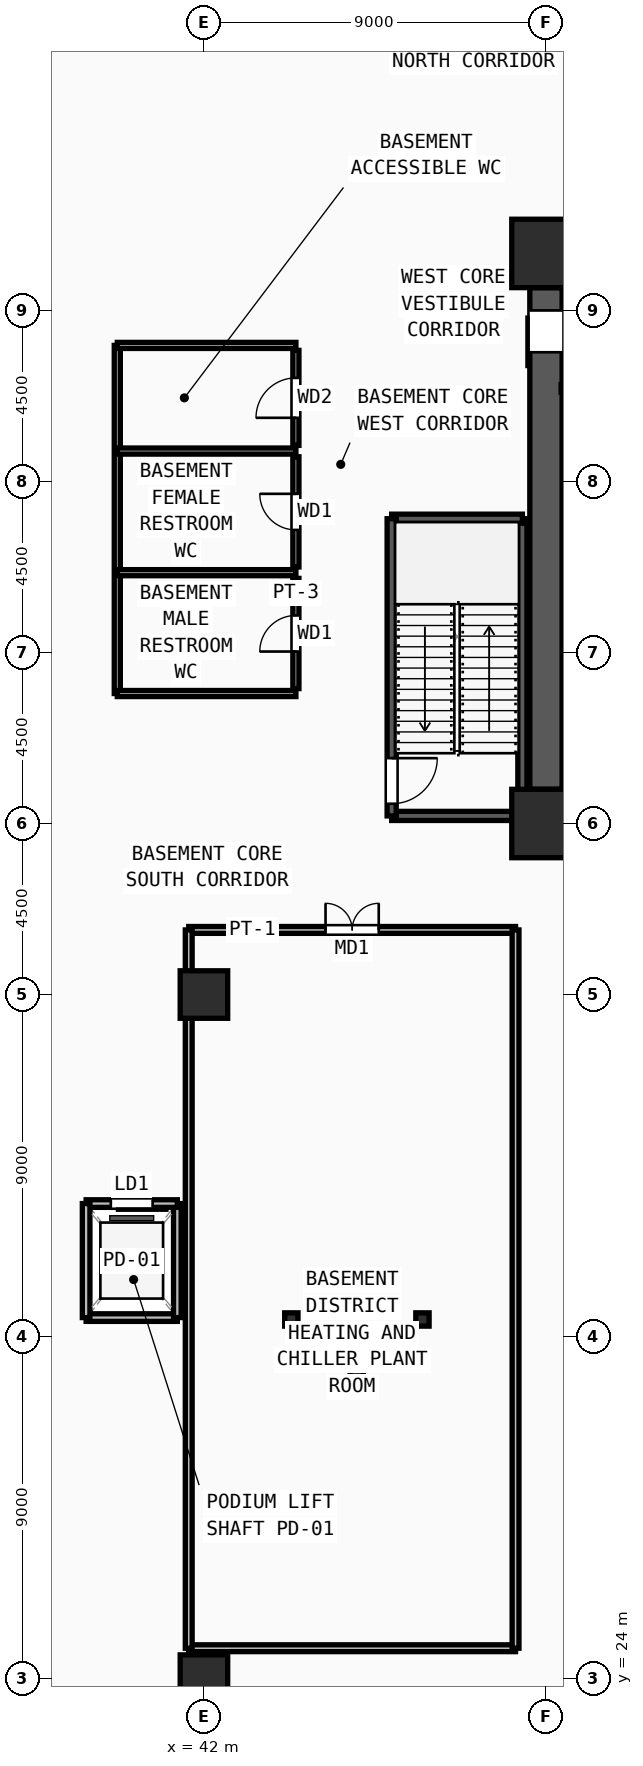
"""IFC4 building model, lengths in metres.
Left out: names, types, materials, properties, quantities, classifications, styles, units other than length and angle.
Written with IfcOpenShell. Run it as: python <this file> out.ifc"""

import sys

from ifc_helpers import new_model, si_unit, direction, frame, frame_2d, origin, origin_2d, place, context, subcontext, project, spatial, rectangle, i_section, extrude, source, transform, mapped, element, fill, save


model = new_model("IFC4")
c1 = context("Model", 3, precision=1e-05, world=origin(), true_north=direction((0.0, 1.0)))
c2 = subcontext(c1, "Body", "Model", "MODEL_VIEW")
j1 = project(units=[si_unit("LENGTHUNIT", "METRE"), si_unit("PLANEANGLEUNIT", "RADIAN")], contexts=[c1])
p1 = place(None, origin())
s1 = spatial("IfcSite", under=j1, at=p1, CompositionType="ELEMENT")
p2 = place(p1, origin())
s2 = spatial("IfcBuilding", under=s1, at=p2, CompositionType="ELEMENT")
p3 = place(p2, frame((0.0, 0.0, -4.8)))
s3 = spatial("IfcBuildingStorey", under=s2, at=p3, CompositionType="ELEMENT", Elevation=-4.8)
m1 = source(origin(), c2, "Body", "SweptSolid", [
    extrude(rectangle(XDim=1.8, YDim=1.8, at=origin_2d()), origin(), (0.0, 0.0, 1.0), 4.8),
])
for number, where, z_axis, x_axis in (
    (1, (51.0, 46.5, 0.0), (0.0, 0.0, 1.0), (1.0, 0.0, 0.0)),
    (2, (51.0, 61.5, 0.0), (0.0, 0.0, 1.0), (1.0, 0.0, 0.0)),
):
    element("IfcColumn", number, at=place(p3, frame(where, z_axis=z_axis, x_axis=x_axis)), inside=s3, PredefinedType="COLUMN", context=c2, shape_type="MappedRepresentation", body=[
        mapped(m1, transform((0.0, 0.0, 0.0), x_axis=(1.0, 0.0, 0.0), y_axis=(0.0, 1.0, 0.0), z_axis=(0.0, 0.0, 1.0), scale=1.0)),
    ])
m2 = source(origin(), c2, "Body", "SweptSolid", [
    extrude(rectangle(XDim=1.25, YDim=1.25, at=origin_2d()), origin(), (0.0, 0.0, 1.0), 4.8),
])
for number, where, z_axis, x_axis in (
    (3, (42.0, 24.0, 0.0), (0.0, 0.0, 1.0), (1.0, 0.0, 0.0)),
    (4, (42.0, 42.0, 0.0), (0.0, 0.0, 1.0), (1.0, 0.0, 0.0)),
):
    element("IfcColumn", number, at=place(p3, frame(where, z_axis=z_axis, x_axis=x_axis)), inside=s3, PredefinedType="COLUMN", context=c2, shape_type="MappedRepresentation", body=[
        mapped(m2, transform((0.0, 0.0, 0.0), x_axis=(1.0, 0.0, 0.0), y_axis=(0.0, 1.0, 0.0), z_axis=(0.0, 0.0, 1.0), scale=1.0)),
    ])
m3 = source(origin(), c2, "Body", "SweptSolid", [
    extrude(i_section(OverallWidth=0.35, OverallDepth=0.35, WebThickness=0.012, FlangeThickness=0.019, at=origin_2d()), origin(), (0.0, 0.0, 1.0), 4.8),
])
for number, where, z_axis, x_axis in (
    (5, (44.3, 33.45, 0.0), (0.0, 0.0, 1.0), (1.0, 0.0, 0.0)),
    (6, (47.75, 33.45, 0.0), (0.0, 0.0, 1.0), (1.0, 0.0, 0.0)),
    (7, (46.02, 32.05, 0.0), (0.0, 0.0, 1.0), (1.0, 0.0, 0.0)),
):
    element("IfcColumn", number, at=place(p3, frame(where, z_axis=z_axis, x_axis=x_axis)), inside=s3, PredefinedType="COLUMN", context=c2, shape_type="MappedRepresentation", body=[
        mapped(m3, transform((0.0, 0.0, 0.0), x_axis=(1.0, 0.0, 0.0), y_axis=(0.0, 1.0, 0.0), z_axis=(0.0, 0.0, 1.0), scale=1.0)),
    ])
p4 = place(p3, frame((51.0, 47.4, 0.0), z_axis=(0.0, 0.0, 1.0), x_axis=(0.0, 1.0, 0.0)))
e8 = element("IfcWall", 8, at=p4, inside=s3, PredefinedType="SHEAR", context=c2, shape_type="SweptSolid", body=[
    extrude(rectangle(XDim=13.2, YDim=0.85, at=frame_2d((6.6, 0.0))), origin(), (0.0, 0.0, 1.0), 4.55),
])
m4 = source(origin(), c2, "Body", "SweptSolid", [
    extrude(rectangle(XDim=1.1, YDim=2.2, at=frame_2d((0.55, 1.1))), frame((0.0, 0.435, 0.0), z_axis=(0.0, -1.0, 0.0), x_axis=(1.0, 0.0, 0.0)), (0.0, 0.0, 1.0), 0.87),
])
p5 = place(p4, frame((11.5, 0.0, 0.0)))
e9 = element("IfcOpeningElement", 9, at=p5, cuts=e8, PredefinedType="OPENING", context=c2, shape_type="MappedRepresentation", body=[
    mapped(m4, transform((0.0, 0.0, 0.0), x_axis=(1.0, 0.0, 0.0), y_axis=(0.0, 1.0, 0.0), z_axis=(0.0, 0.0, 1.0), scale=1.0)),
])
p6 = place(p3, frame((46.94, 46.7, 0.0), z_axis=(0.0, 0.0, 1.0), x_axis=(1.0, 0.0, 0.0)))
e10 = element("IfcWall", 10, at=p6, inside=s3, PredefinedType="SOLIDWALL", context=c2, shape_type="SweptSolid", body=[
    extrude(rectangle(XDim=3.44, YDim=0.24, at=frame_2d((1.72, 0.0))), origin(), (0.0, 0.0, 1.0), 4.55),
])
p7 = place(p3, frame((50.38, 46.7, 0.0), z_axis=(0.0, 0.0, 1.0), x_axis=(0.0, 1.0, 0.0)))
e11 = element("IfcWall", 11, at=p7, inside=s3, PredefinedType="SOLIDWALL", context=c2, shape_type="SweptSolid", body=[
    extrude(rectangle(XDim=7.82, YDim=0.24, at=frame_2d((3.91, 0.0))), origin(), (0.0, 0.0, 1.0), 4.55),
])
p8 = place(p3, frame((50.38, 54.52, 0.0), z_axis=(0.0, 0.0, 1.0), x_axis=(-1.0, 0.0, 0.0)))
e12 = element("IfcWall", 12, at=p8, inside=s3, PredefinedType="SOLIDWALL", context=c2, shape_type="SweptSolid", body=[
    extrude(rectangle(XDim=3.44, YDim=0.24, at=frame_2d((1.72, 0.0))), origin(), (0.0, 0.0, 1.0), 4.55),
])
p9 = place(p3, frame((46.94, 54.52, 0.0), z_axis=(0.0, 0.0, 1.0), x_axis=(0.0, -1.0, 0.0)))
e13 = element("IfcWall", 13, at=p9, inside=s3, PredefinedType="SOLIDWALL", context=c2, shape_type="SweptSolid", body=[
    extrude(rectangle(XDim=7.82, YDim=0.24, at=frame_2d((3.91, 0.0))), origin(), (0.0, 0.0, 1.0), 4.55),
])
m5 = source(origin(), c2, "Body", "SweptSolid", [
    extrude(rectangle(XDim=1.2, YDim=2.2, at=frame_2d((0.6, 1.1))), frame((0.0, 0.13, 0.0), z_axis=(0.0, -1.0, 0.0), x_axis=(1.0, 0.0, 0.0)), (0.0, 0.0, 1.0), 0.26),
])
p10 = place(p9, frame((6.3, 0.0, 0.0)))
e14 = element("IfcOpeningElement", 14, at=p10, cuts=e13, PredefinedType="OPENING", context=c2, shape_type="MappedRepresentation", body=[
    mapped(m5, transform((0.0, 0.0, 0.0), x_axis=(1.0, 0.0, 0.0), y_axis=(0.0, 1.0, 0.0), z_axis=(0.0, 0.0, 1.0), scale=1.0)),
])
for number, where, z_axis, x_axis in (
    (15, (51.4, 57.95, 0.0), (0.0, 0.0, 1.0), (1.0, 0.0, 0.0)),
    (16, (53.8, 60.88, 0.0), (0.0, 0.0, 1.0), (-1.0, 0.0, 0.0)),
    (17, (38.9, 33.5, 0.0), (0.0, 0.0, 1.0), (1.0, 0.0, 0.0)),
):
    element("IfcWall", number, at=place(p3, frame(where, z_axis=z_axis, x_axis=x_axis)), inside=s3, PredefinedType="SOLIDWALL", context=c2, shape_type="SweptSolid", body=[
        extrude(rectangle(XDim=2.4, YDim=0.2, at=frame_2d((1.2, 0.0))), origin(), (0.0, 0.0, 1.0), 4.55),
    ])
p11 = place(p3, frame((41.3, 33.5, 0.0), z_axis=(0.0, 0.0, 1.0), x_axis=(0.0, 1.0, 0.0)))
e18 = element("IfcWall", 18, at=p11, inside=s3, PredefinedType="SOLIDWALL", context=c2, shape_type="SweptSolid", body=[
    extrude(rectangle(XDim=3.0, YDim=0.2, at=frame_2d((1.5, 0.0))), origin(), (0.0, 0.0, 1.0), 4.55),
])
p12 = place(p3, frame((41.3, 36.5, 0.0), z_axis=(0.0, 0.0, 1.0), x_axis=(-1.0, 0.0, 0.0)))
e19 = element("IfcWall", 19, at=p12, inside=s3, PredefinedType="SOLIDWALL", context=c2, shape_type="SweptSolid", body=[
    extrude(rectangle(XDim=2.4, YDim=0.2, at=frame_2d((1.2, 0.0))), origin(), (0.0, 0.0, 1.0), 4.55),
])
m6 = source(origin(), c2, "Body", "SweptSolid", [
    extrude(rectangle(XDim=1.1, YDim=2.2, at=frame_2d((0.55, 1.1))), frame((0.0, 0.11, 0.0), z_axis=(0.0, -1.0, 0.0), x_axis=(1.0, 0.0, 0.0)), (0.0, 0.0, 1.0), 0.22),
])
p13 = place(p12, frame((0.65, 0.0, 0.0)))
e20 = element("IfcOpeningElement", 20, at=p13, cuts=e19, PredefinedType="OPENING", context=c2, shape_type="MappedRepresentation", body=[
    mapped(m6, transform((0.0, 0.0, 0.0), x_axis=(1.0, 0.0, 0.0), y_axis=(0.0, 1.0, 0.0), z_axis=(0.0, 0.0, 1.0), scale=1.0)),
])
p14 = place(p3, frame((38.9, 36.5, 0.0), z_axis=(0.0, 0.0, 1.0), x_axis=(0.0, -1.0, 0.0)))
e21 = element("IfcWall", 21, at=p14, inside=s3, PredefinedType="SOLIDWALL", context=c2, shape_type="SweptSolid", body=[
    extrude(rectangle(XDim=3.0, YDim=0.2, at=frame_2d((1.5, 0.0))), origin(), (0.0, 0.0, 1.0), 4.55),
])
p15 = place(p3, frame((44.42, 50.05, 0.0), z_axis=(0.0, 0.0, 1.0), x_axis=(0.0, 1.0, 0.0)))
e22 = element("IfcWall", 22, at=p15, inside=s3, PredefinedType="PARTITIONING", context=c2, shape_type="SweptSolid", body=[
    extrude(rectangle(XDim=2.9, YDim=0.16, at=frame_2d((1.45, 0.0))), origin(), (0.0, 0.0, 1.0), 4.55),
])
m7 = source(origin(), c2, "Body", "SweptSolid", [
    extrude(rectangle(XDim=0.95, YDim=2.15, at=frame_2d((0.475, 1.075))), frame((0.0, 0.09, 0.0), z_axis=(0.0, -1.0, 0.0), x_axis=(1.0, 0.0, 0.0)), (0.0, 0.0, 1.0), 0.18),
])
p16 = place(p15, frame((0.975, 0.0, 0.0)))
e23 = element("IfcOpeningElement", 23, at=p16, cuts=e22, PredefinedType="OPENING", context=c2, shape_type="MappedRepresentation", body=[
    mapped(m7, transform((0.0, 0.0, 0.0), x_axis=(1.0, 0.0, 0.0), y_axis=(0.0, 1.0, 0.0), z_axis=(0.0, 0.0, 1.0), scale=1.0)),
])
p17 = place(p3, frame((44.42, 53.25, 0.0), z_axis=(0.0, 0.0, 1.0), x_axis=(0.0, 1.0, 0.0)))
e24 = element("IfcWall", 24, at=p17, inside=s3, PredefinedType="PARTITIONING", context=c2, shape_type="SweptSolid", body=[
    extrude(rectangle(XDim=2.9, YDim=0.16, at=frame_2d((1.45, 0.0))), origin(), (0.0, 0.0, 1.0), 4.55),
])
p18 = place(p17, frame((0.975, 0.0, 0.0)))
e25 = element("IfcOpeningElement", 25, at=p18, cuts=e24, PredefinedType="OPENING", context=c2, shape_type="MappedRepresentation", body=[
    mapped(m7, transform((0.0, 0.0, 0.0), x_axis=(1.0, 0.0, 0.0), y_axis=(0.0, 1.0, 0.0), z_axis=(0.0, 0.0, 1.0), scale=1.0)),
])
p19 = place(p3, frame((44.42, 56.45, 0.0), z_axis=(0.0, 0.0, 1.0), x_axis=(0.0, 1.0, 0.0)))
e26 = element("IfcWall", 26, at=p19, inside=s3, PredefinedType="PARTITIONING", context=c2, shape_type="SweptSolid", body=[
    extrude(rectangle(XDim=2.5, YDim=0.16, at=frame_2d((1.25, 0.0))), origin(), (0.0, 0.0, 1.0), 4.55),
])
m8 = source(origin(), c2, "Body", "SweptSolid", [
    extrude(rectangle(XDim=1.05, YDim=2.15, at=frame_2d((0.525, 1.075))), frame((0.0, 0.09, 0.0), z_axis=(0.0, -1.0, 0.0), x_axis=(1.0, 0.0, 0.0)), (0.0, 0.0, 1.0), 0.18),
])
p20 = place(p19, frame((0.725, 0.0, 0.0)))
e27 = element("IfcOpeningElement", 27, at=p20, cuts=e26, PredefinedType="OPENING", context=c2, shape_type="MappedRepresentation", body=[
    mapped(m8, transform((0.0, 0.0, 0.0), x_axis=(1.0, 0.0, 0.0), y_axis=(0.0, 1.0, 0.0), z_axis=(0.0, 0.0, 1.0), scale=1.0)),
])
p21 = place(p3, frame((41.6, 43.7, 0.0), z_axis=(0.0, 0.0, 1.0), x_axis=(1.0, 0.0, 0.0)))
e28 = element("IfcWall", 28, at=p21, inside=s3, PredefinedType="PARTITIONING", context=c2, shape_type="SweptSolid", body=[
    extrude(rectangle(XDim=8.6, YDim=0.18, at=frame_2d((4.3, 0.0))), origin(), (0.0, 0.0, 1.0), 4.55),
])
m9 = source(origin(), c2, "Body", "SweptSolid", [
    extrude(rectangle(XDim=1.4, YDim=2.25, at=frame_2d((0.7, 1.125))), frame((0.0, 0.1, 0.0), z_axis=(0.0, -1.0, 0.0), x_axis=(1.0, 0.0, 0.0)), (0.0, 0.0, 1.0), 0.2),
])
p22 = place(p21, frame((3.6, 0.0, 0.0)))
e29 = element("IfcOpeningElement", 29, at=p22, cuts=e28, PredefinedType="OPENING", context=c2, shape_type="MappedRepresentation", body=[
    mapped(m9, transform((0.0, 0.0, 0.0), x_axis=(1.0, 0.0, 0.0), y_axis=(0.0, 1.0, 0.0), z_axis=(0.0, 0.0, 1.0), scale=1.0)),
])
p23 = place(p3, frame((39.72, 49.92, 0.0), z_axis=(0.0, 0.0, 1.0), x_axis=(0.0, 1.0, 0.0)))
e30 = element("IfcWall", 30, at=p23, inside=s3, PredefinedType="PARTITIONING", context=c2, shape_type="SweptSolid", body=[
    extrude(rectangle(XDim=9.16, YDim=0.16, at=frame_2d((4.58, 0.0))), origin(), (0.0, 0.0, 1.0), 4.55),
])
for number, where, z_axis, x_axis in (
    (31, (39.72, 49.92, 0.0), (0.0, 0.0, 1.0), (1.0, 0.0, 0.0)),
    (32, (39.72, 53.1, 0.0), (0.0, 0.0, 1.0), (1.0, 0.0, 0.0)),
    (33, (39.72, 56.3, 0.0), (0.0, 0.0, 1.0), (1.0, 0.0, 0.0)),
    (34, (39.72, 59.08, 0.0), (0.0, 0.0, 1.0), (1.0, 0.0, 0.0)),
):
    element("IfcWall", number, at=place(p3, frame(where, z_axis=z_axis, x_axis=x_axis)), inside=s3, PredefinedType="PARTITIONING", context=c2, shape_type="SweptSolid", body=[
        extrude(rectangle(XDim=4.7, YDim=0.16, at=frame_2d((2.35, 0.0))), origin(), (0.0, 0.0, 1.0), 4.55),
    ])
p24 = place(p3, frame((41.6, 24.8, 0.0), z_axis=(0.0, 0.0, 1.0), x_axis=(1.0, 0.0, 0.0)))
e35 = element("IfcWall", 35, at=p24, inside=s3, PredefinedType="PARTITIONING", context=c2, shape_type="SweptSolid", body=[
    extrude(rectangle(XDim=8.6, YDim=0.18, at=frame_2d((4.3, 0.0))), origin(), (0.0, 0.0, 1.0), 4.55),
])
for number, where, z_axis, x_axis in (
    (36, (41.6, 24.8, 0.0), (0.0, 0.0, 1.0), (0.0, 1.0, 0.0)),
    (37, (50.2, 24.8, 0.0), (0.0, 0.0, 1.0), (0.0, 1.0, 0.0)),
):
    element("IfcWall", number, at=place(p3, frame(where, z_axis=z_axis, x_axis=x_axis)), inside=s3, PredefinedType="PARTITIONING", context=c2, shape_type="SweptSolid", body=[
        extrude(rectangle(XDim=18.9, YDim=0.18, at=frame_2d((9.45, 0.0))), origin(), (0.0, 0.0, 1.0), 4.55),
    ])
m10 = source(origin(), c2, "Body", "SweptSolid", [
    extrude(rectangle(XDim=1.2, YDim=2.2, at=frame_2d((0.6, 1.1))), frame((0.0, 0.025, 0.0), z_axis=(0.0, -1.0, 0.0), x_axis=(1.0, 0.0, 0.0)), (0.0, 0.0, 1.0), 0.05),
])
p25 = place(p10, origin())
e38 = element("IfcDoor", 38, at=p25, inside=s3, OperationType="SINGLE_SWING_LEFT", PredefinedType="DOOR", context=c2, shape_type="MappedRepresentation", body=[
    mapped(m10, transform((0.0, 0.0, 0.0), x_axis=(1.0, 0.0, 0.0), y_axis=(0.0, 1.0, 0.0), z_axis=(0.0, 0.0, 1.0), scale=1.0)),
])
fill(e14, e38)
m11 = source(origin(), c2, "Body", "SweptSolid", [
    extrude(rectangle(XDim=1.1, YDim=2.2, at=frame_2d((0.55, 1.1))), frame((0.0, 0.025, 0.0), z_axis=(0.0, -1.0, 0.0), x_axis=(1.0, 0.0, 0.0)), (0.0, 0.0, 1.0), 0.05),
])
p26 = place(p5, origin())
e39 = element("IfcDoor", 39, at=p26, inside=s3, OperationType="SLIDING_TO_LEFT", PredefinedType="DOOR", context=c2, shape_type="MappedRepresentation", body=[
    mapped(m11, transform((0.0, 0.0, 0.0), x_axis=(1.0, 0.0, 0.0), y_axis=(0.0, 1.0, 0.0), z_axis=(0.0, 0.0, 1.0), scale=1.0)),
])
fill(e9, e39)
p27 = place(p13, origin())
e40 = element("IfcDoor", 40, at=p27, inside=s3, OperationType="SLIDING_TO_LEFT", PredefinedType="DOOR", context=c2, shape_type="MappedRepresentation", body=[
    mapped(m11, transform((0.0, 0.0, 0.0), x_axis=(1.0, 0.0, 0.0), y_axis=(0.0, 1.0, 0.0), z_axis=(0.0, 0.0, 1.0), scale=1.0)),
])
fill(e20, e40)
m12 = source(origin(), c2, "Body", "SweptSolid", [
    extrude(rectangle(XDim=0.95, YDim=2.15, at=frame_2d((0.475, 1.075))), frame((0.0, 0.025, 0.0), z_axis=(0.0, -1.0, 0.0), x_axis=(1.0, 0.0, 0.0)), (0.0, 0.0, 1.0), 0.05),
])
p28 = place(p16, origin())
e41 = element("IfcDoor", 41, at=p28, inside=s3, OperationType="SINGLE_SWING_LEFT", PredefinedType="DOOR", context=c2, shape_type="MappedRepresentation", body=[
    mapped(m12, transform((0.0, 0.0, 0.0), x_axis=(1.0, 0.0, 0.0), y_axis=(0.0, 1.0, 0.0), z_axis=(0.0, 0.0, 1.0), scale=1.0)),
])
fill(e23, e41)
p29 = place(p18, origin())
e42 = element("IfcDoor", 42, at=p29, inside=s3, OperationType="SINGLE_SWING_RIGHT", PredefinedType="DOOR", context=c2, shape_type="MappedRepresentation", body=[
    mapped(m12, transform((0.0, 0.0, 0.0), x_axis=(1.0, 0.0, 0.0), y_axis=(0.0, 1.0, 0.0), z_axis=(0.0, 0.0, 1.0), scale=1.0)),
])
fill(e25, e42)
m13 = source(origin(), c2, "Body", "SweptSolid", [
    extrude(rectangle(XDim=1.05, YDim=2.15, at=frame_2d((0.525, 1.075))), frame((0.0, 0.025, 0.0), z_axis=(0.0, -1.0, 0.0), x_axis=(1.0, 0.0, 0.0)), (0.0, 0.0, 1.0), 0.05),
])
p30 = place(p20, origin())
e43 = element("IfcDoor", 43, at=p30, inside=s3, OperationType="SINGLE_SWING_LEFT", PredefinedType="DOOR", context=c2, shape_type="MappedRepresentation", body=[
    mapped(m13, transform((0.0, 0.0, 0.0), x_axis=(1.0, 0.0, 0.0), y_axis=(0.0, 1.0, 0.0), z_axis=(0.0, 0.0, 1.0), scale=1.0)),
])
fill(e27, e43)
m14 = source(origin(), c2, "Body", "SweptSolid", [
    extrude(rectangle(XDim=1.4, YDim=2.25, at=frame_2d((0.7, 1.125))), frame((0.0, 0.025, 0.0), z_axis=(0.0, -1.0, 0.0), x_axis=(1.0, 0.0, 0.0)), (0.0, 0.0, 1.0), 0.05),
])
p31 = place(p22, origin())
e44 = element("IfcDoor", 44, at=p31, inside=s3, OperationType="DOUBLE_DOOR_SINGLE_SWING", PredefinedType="DOOR", context=c2, shape_type="MappedRepresentation", body=[
    mapped(m14, transform((0.0, 0.0, 0.0), x_axis=(1.0, 0.0, 0.0), y_axis=(0.0, 1.0, 0.0), z_axis=(0.0, 0.0, 1.0), scale=1.0)),
])
fill(e29, e44)
save(model, sys.argv[1])
